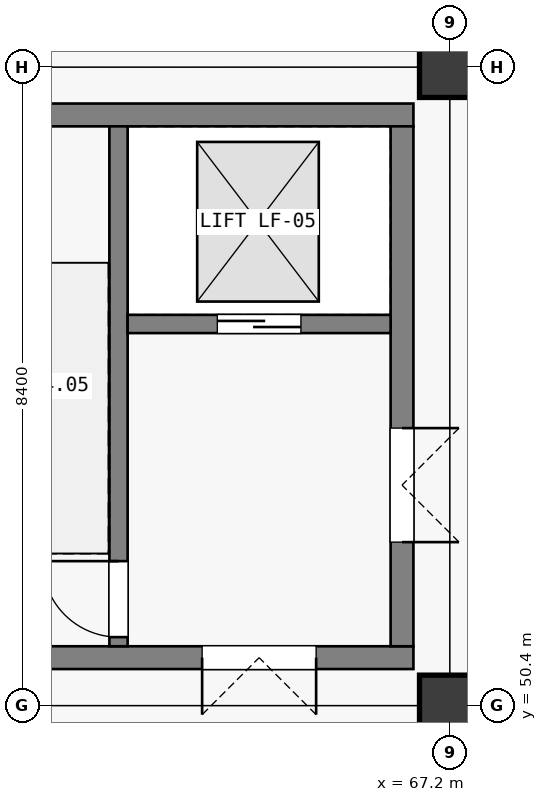
"""IFC4 building model, lengths in metres.
Left out: names, types, materials, properties, quantities, classifications, styles, units other than length and angle.
Written with IfcOpenShell. Run it as: python <this file> out.ifc"""

import sys

from ifc_helpers import new_model, si_unit, direction, frame, frame_2d, origin, origin_2d, place, context, subcontext, project, spatial, rectangle, extrude, element, fill, save


model = new_model("IFC4")
c1 = context("Model", 3, precision=1e-05, world=origin(), true_north=direction((0.0, 1.0)))
c2 = subcontext(c1, "Body", "Model", "MODEL_VIEW")
j1 = project(units=[si_unit("LENGTHUNIT", "METRE"), si_unit("PLANEANGLEUNIT", "RADIAN")], contexts=[c1])
p1 = place(None, origin())
s1 = spatial("IfcSite", under=j1, at=p1, CompositionType="ELEMENT")
p2 = place(p1, origin())
s2 = spatial("IfcBuilding", under=s1, at=p2, CompositionType="ELEMENT")
p3 = place(p2, origin())
s3 = spatial("IfcBuildingStorey", under=s2, at=p3, CompositionType="ELEMENT", Elevation=0.0)
for number, where, z_axis, x_axis in (
    (1, (67.2, 50.4, 0.0), (0.0, 0.0, 1.0), (1.0, 0.0, 0.0)),
    (2, (67.2, 58.8, 0.0), (0.0, 0.0, 1.0), (1.0, 0.0, 0.0)),
):
    element("IfcColumn", number, at=place(p3, frame(where, z_axis=z_axis, x_axis=x_axis)), inside=s3, PredefinedType="COLUMN", context=c2, shape_type="SweptSolid", body=[
        extrude(rectangle(XDim=0.8, YDim=0.8, at=origin_2d()), origin(), (0.0, 0.0, 1.0), 5.76),
    ])
p4 = place(p3, frame((66.72, 51.03, 0.0), z_axis=(0.0, 0.0, 1.0), x_axis=(-1.0, 0.0, 0.0)))
e3 = element("IfcWall", 3, at=p4, inside=s3, PredefinedType="SHEAR", context=c2, shape_type="SweptSolid", body=[
    extrude(rectangle(XDim=7.44, YDim=0.3, at=frame_2d((3.72, 0.0))), origin(), (0.0, 0.0, 1.0), 5.76),
])
p5 = place(p4, frame((1.28, 0.0, 0.0)))
e4 = element("IfcOpeningElement", 4, at=p5, cuts=e3, PredefinedType="OPENING", context=c2, shape_type="SweptSolid", body=[
    extrude(rectangle(XDim=1.5, YDim=2.15, at=frame_2d((0.75, 1.075))), frame((0.0, 0.15, 0.0), z_axis=(0.0, -1.0, 0.0), x_axis=(1.0, 0.0, 0.0)), (0.0, 0.0, 1.0), 0.3),
])
p6 = place(p3, frame((59.28, 58.17, 0.0), z_axis=(0.0, 0.0, 1.0), x_axis=(1.0, 0.0, 0.0)))
e5 = element("IfcWall", 5, at=p6, inside=s3, PredefinedType="SHEAR", context=c2, shape_type="SweptSolid", body=[
    extrude(rectangle(XDim=7.44, YDim=0.3, at=frame_2d((3.72, 0.0))), origin(), (0.0, 0.0, 1.0), 5.76),
])
p7 = place(p3, frame((66.57, 58.02, 0.0), z_axis=(0.0, 0.0, 1.0), x_axis=(0.0, -1.0, 0.0)))
e6 = element("IfcWall", 6, at=p7, inside=s3, PredefinedType="SHEAR", context=c2, shape_type="SweptSolid", body=[
    extrude(rectangle(XDim=6.84, YDim=0.3, at=frame_2d((3.42, 0.0))), origin(), (0.0, 0.0, 1.0), 5.76),
])
p8 = place(p7, frame((3.97, 0.0, 0.0)))
e7 = element("IfcOpeningElement", 7, at=p8, cuts=e6, PredefinedType="OPENING", context=c2, shape_type="SweptSolid", body=[
    extrude(rectangle(XDim=1.5, YDim=2.15, at=frame_2d((0.75, 1.075))), frame((0.0, 0.15, 0.0), z_axis=(0.0, -1.0, 0.0), x_axis=(1.0, 0.0, 0.0)), (0.0, 0.0, 1.0), 0.3),
])
p9 = place(p3, frame((62.84, 51.18, 0.0), z_axis=(0.0, 0.0, 1.0), x_axis=(0.0, 1.0, 0.0)))
e8 = element("IfcWall", 8, at=p9, inside=s3, PredefinedType="SHEAR", context=c2, shape_type="SweptSolid", body=[
    extrude(rectangle(XDim=6.84, YDim=0.24, at=frame_2d((3.42, 0.0))), origin(), (0.0, 0.0, 1.0), 5.76),
])
p10 = place(p9, frame((0.12, 0.0, 0.0)))
e9 = element("IfcOpeningElement", 9, at=p10, cuts=e8, PredefinedType="OPENING", context=c2, shape_type="SweptSolid", body=[
    extrude(rectangle(XDim=1.0, YDim=2.15, at=frame_2d((0.5, 1.075))), frame((0.0, 0.12, 0.0), z_axis=(0.0, -1.0, 0.0), x_axis=(1.0, 0.0, 0.0)), (0.0, 0.0, 1.0), 0.24),
])
p11 = place(p3, frame((62.96, 55.42, 0.0), z_axis=(0.0, 0.0, 1.0), x_axis=(1.0, 0.0, 0.0)))
e10 = element("IfcWall", 10, at=p11, inside=s3, PredefinedType="SHEAR", context=c2, shape_type="SweptSolid", body=[
    extrude(rectangle(XDim=3.46, YDim=0.24, at=frame_2d((1.73, 0.0))), origin(), (0.0, 0.0, 1.0), 5.76),
])
p12 = place(p11, frame((1.18, 0.0, 0.0)))
e11 = element("IfcOpeningElement", 11, at=p12, cuts=e10, PredefinedType="OPENING", context=c2, shape_type="SweptSolid", body=[
    extrude(rectangle(XDim=1.1, YDim=2.15, at=frame_2d((0.55, 1.075))), frame((0.0, 0.12, 0.0), z_axis=(0.0, -1.0, 0.0), x_axis=(1.0, 0.0, 0.0)), (0.0, 0.0, 1.0), 0.24),
])
p13 = place(p10, origin())
e12 = element("IfcDoor", 12, at=p13, inside=s3, OperationType="SINGLE_SWING_RIGHT", PredefinedType="DOOR", context=c2, shape_type="SweptSolid", body=[
    extrude(rectangle(XDim=1.0, YDim=2.15, at=frame_2d((0.5, 1.075))), frame((0.0, 0.025, 0.0), z_axis=(0.0, -1.0, 0.0), x_axis=(1.0, 0.0, 0.0)), (0.0, 0.0, 1.0), 0.05),
])
fill(e9, e12)
p14 = place(p8, origin())
e13 = element("IfcDoor", 13, at=p14, inside=s3, OperationType="DOUBLE_DOOR_SINGLE_SWING", PredefinedType="DOOR", context=c2, shape_type="SweptSolid", body=[
    extrude(rectangle(XDim=1.5, YDim=2.15, at=frame_2d((0.75, 1.075))), frame((0.0, 0.025, 0.0), z_axis=(0.0, -1.0, 0.0), x_axis=(1.0, 0.0, 0.0)), (0.0, 0.0, 1.0), 0.05),
])
fill(e7, e13)
p15 = place(p5, origin())
e14 = element("IfcDoor", 14, at=p15, inside=s3, OperationType="DOUBLE_DOOR_SINGLE_SWING", PredefinedType="DOOR", context=c2, shape_type="SweptSolid", body=[
    extrude(rectangle(XDim=1.5, YDim=2.15, at=frame_2d((0.75, 1.075))), frame((0.0, 0.025, 0.0), z_axis=(0.0, -1.0, 0.0), x_axis=(1.0, 0.0, 0.0)), (0.0, 0.0, 1.0), 0.05),
])
fill(e4, e14)
p16 = place(p12, origin())
e15 = element("IfcDoor", 15, at=p16, inside=s3, OperationType="DOUBLE_DOOR_SLIDING", PredefinedType="DOOR", context=c2, shape_type="SweptSolid", body=[
    extrude(rectangle(XDim=1.1, YDim=2.15, at=frame_2d((0.55, 1.075))), frame((0.0, 0.025, 0.0), z_axis=(0.0, -1.0, 0.0), x_axis=(1.0, 0.0, 0.0)), (0.0, 0.0, 1.0), 0.05),
])
fill(e11, e15)
save(model, sys.argv[1])
